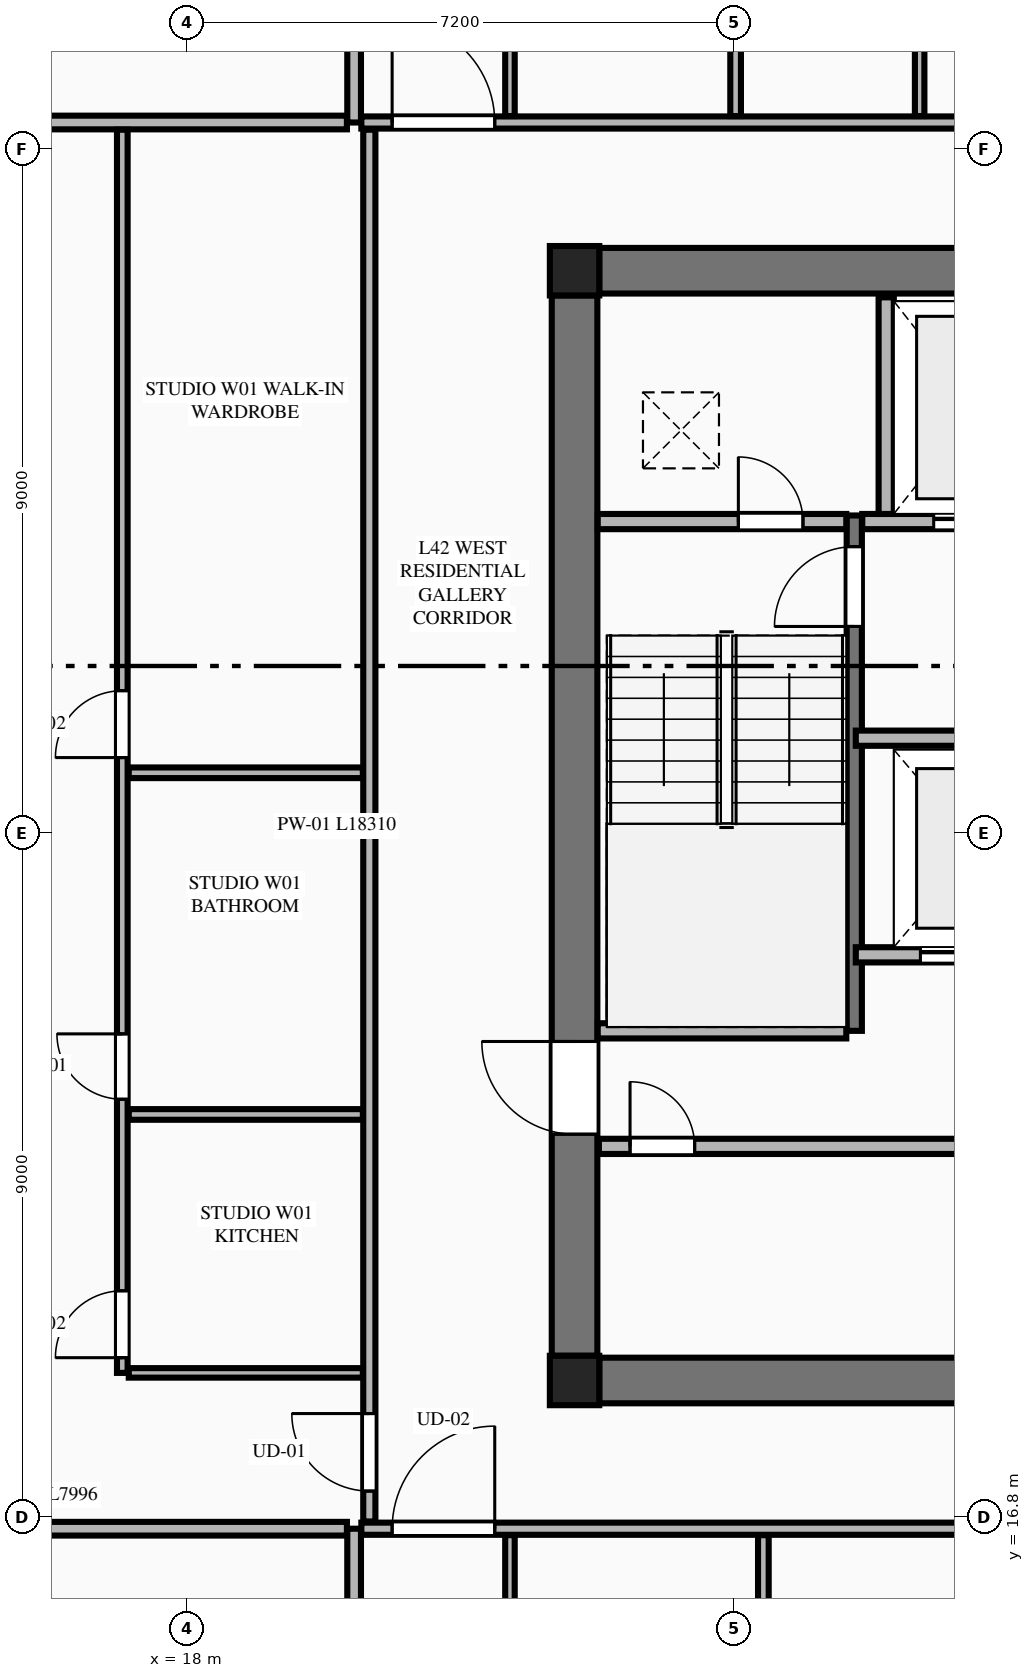
"""IFC4 building model, lengths in metres.
Left out: names, types, materials, properties, quantities, classifications, styles, units other than length and angle.
Written with IfcOpenShell. Run it as: python <this file> out.ifc"""

import sys

from ifc_helpers import new_model, si_unit, direction, frame, frame_2d, origin, origin_2d, place, context, subcontext, project, spatial, rectangle, extrude, element, fill, save


model = new_model("IFC4")
c1 = context("Model", 3, precision=1e-05, world=origin(), true_north=direction((0.0, 1.0)))
c2 = subcontext(c1, "Body", "Model", "MODEL_VIEW")
j1 = project(units=[si_unit("LENGTHUNIT", "METRE"), si_unit("PLANEANGLEUNIT", "RADIAN")], contexts=[c1])
p1 = place(None, origin())
s1 = spatial("IfcSite", under=j1, at=p1, CompositionType="ELEMENT")
p2 = place(p1, origin())
s2 = spatial("IfcBuilding", under=s1, at=p2, CompositionType="ELEMENT")
p3 = place(p2, frame((0.0, 0.0, 160.6)))
s3 = spatial("IfcBuildingStorey", under=s2, at=p3, CompositionType="ELEMENT", Elevation=160.6)
for number, where, z_axis, x_axis in (
    (1, (23.1, 18.6, 0.0), (0.0, 0.0, 1.0), (1.0, 0.0, 0.0)),
    (2, (23.1, 33.2, 0.0), (0.0, 0.0, 1.0), (1.0, 0.0, 0.0)),
):
    element("IfcColumn", number, at=place(p3, frame(where, z_axis=z_axis, x_axis=x_axis)), inside=s3, PredefinedType="COLUMN", context=c2, shape_type="SweptSolid", body=[
        extrude(rectangle(XDim=0.65, YDim=0.65, at=origin_2d()), origin(), (0.0, 0.0, 1.0), 3.55),
    ])
for number, where, z_axis, x_axis in (
    (3, (23.425, 18.6, 0.0), (0.0, 0.0, 1.0), (1.0, 0.0, 0.0)),
    (4, (23.425, 33.2, 0.0), (0.0, 0.0, 1.0), (1.0, 0.0, 0.0)),
):
    element("IfcWall", number, at=place(p3, frame(where, z_axis=z_axis, x_axis=x_axis)), inside=s3, PredefinedType="SHEAR", context=c2, shape_type="SweptSolid", body=[
        extrude(rectangle(XDim=17.95, YDim=0.6, at=frame_2d((8.975, 0.0))), origin(), (0.0, 0.0, 1.0), 3.34),
    ])
p4 = place(p3, frame((23.1, 18.925, 0.0), z_axis=(0.0, 0.0, 1.0), x_axis=(0.0, 1.0, 0.0)))
e5 = element("IfcWall", 5, at=p4, inside=s3, PredefinedType="SHEAR", context=c2, shape_type="SweptSolid", body=[
    extrude(rectangle(XDim=13.95, YDim=0.6, at=frame_2d((6.975, 0.0))), origin(), (0.0, 0.0, 1.0), 3.34),
])
p5 = place(p4, frame((2.915, 0.0, 0.0)))
e6 = element("IfcOpeningElement", 6, at=p5, cuts=e5, PredefinedType="OPENING", context=c2, shape_type="SweptSolid", body=[
    extrude(rectangle(XDim=1.22, YDim=2.25, at=frame_2d((0.61, 1.125))), frame((0.0, 0.31, 0.0), z_axis=(0.0, -1.0, 0.0), x_axis=(1.0, 0.0, 0.0)), (0.0, 0.0, 1.0), 0.62),
])
p6 = place(p3, frame((26.78, 23.2, 0.0), z_axis=(0.0, 0.0, 1.0), x_axis=(0.0, 1.0, 0.0)))
e7 = element("IfcWall", 7, at=p6, inside=s3, PredefinedType="SHEAR", context=c2, shape_type="SweptSolid", body=[
    extrude(rectangle(XDim=6.78, YDim=0.2, at=frame_2d((3.39, 0.0))), origin(), (0.0, 0.0, 1.0), 3.55),
])
p7 = place(p6, frame((5.32, 0.0, 0.0)))
e8 = element("IfcOpeningElement", 8, at=p7, cuts=e7, PredefinedType="OPENING", context=c2, shape_type="SweptSolid", body=[
    extrude(rectangle(XDim=1.05, YDim=2.15, at=frame_2d((0.525, 1.075))), frame((0.0, 0.11, 0.0), z_axis=(0.0, -1.0, 0.0), x_axis=(1.0, 0.0, 0.0)), (0.0, 0.0, 1.0), 0.22),
])
p8 = place(p3, frame((23.405, 23.2, 0.0), z_axis=(0.0, 0.0, 1.0), x_axis=(1.0, 0.0, 0.0)))
e9 = element("IfcWall", 9, at=p8, inside=s3, PredefinedType="PLUMBINGWALL", context=c2, shape_type="SweptSolid", body=[
    extrude(rectangle(XDim=3.27, YDim=0.2, at=frame_2d((1.635, 0.0))), origin(), (0.0, 0.0, 1.0), 3.34),
])
p9 = place(p3, frame((23.405, 29.9, 0.0), z_axis=(0.0, 0.0, 1.0), x_axis=(1.0, 0.0, 0.0)))
e10 = element("IfcWall", 10, at=p9, inside=s3, PredefinedType="PLUMBINGWALL", context=c2, shape_type="SweptSolid", body=[
    extrude(rectangle(XDim=3.27, YDim=0.2, at=frame_2d((1.635, 0.0))), origin(), (0.0, 0.0, 1.0), 3.34),
])
p10 = place(p9, frame((1.85, 0.0, 0.0)))
e11 = element("IfcOpeningElement", 11, at=p10, cuts=e10, PredefinedType="OPENING", context=c2, shape_type="SweptSolid", body=[
    extrude(rectangle(XDim=0.85, YDim=2.05, at=frame_2d((0.425, 1.025))), frame((0.0, 0.11, 0.0), z_axis=(0.0, -1.0, 0.0), x_axis=(1.0, 0.0, 0.0)), (0.0, 0.0, 1.0), 0.22),
])
p11 = place(p3, frame((26.885, 29.9, 0.0), z_axis=(0.0, 0.0, 1.0), x_axis=(1.0, 0.0, 0.0)))
e12 = element("IfcWall", 12, at=p11, inside=s3, PredefinedType="PLUMBINGWALL", context=c2, shape_type="SweptSolid", body=[
    extrude(rectangle(XDim=3.015, YDim=0.2, at=frame_2d((1.507, 0.0))), origin(), (0.0, 0.0, 1.0), 3.34),
])
p12 = place(p11, frame((0.94, 0.0, 0.0)))
e13 = element("IfcOpeningElement", 13, at=p12, cuts=e12, PredefinedType="OPENING", context=c2, shape_type="SweptSolid", body=[
    extrude(rectangle(XDim=1.15, YDim=2.2, at=frame_2d((0.575, 1.1))), frame((0.0, 0.11, 0.0), z_axis=(0.0, -1.0, 0.0), x_axis=(1.0, 0.0, 0.0)), (0.0, 0.0, 1.0), 0.22),
])
p13 = place(p3, frame((27.2, 30.0, 0.0), z_axis=(0.0, 0.0, 1.0), x_axis=(0.0, 1.0, 0.0)))
e14 = element("IfcWall", 14, at=p13, inside=s3, PredefinedType="PLUMBINGWALL", context=c2, shape_type="SweptSolid", body=[
    extrude(rectangle(XDim=2.85, YDim=0.2, at=frame_2d((1.425, 0.0))), origin(), (0.0, 0.0, 1.0), 3.34),
])
p14 = place(p3, frame((26.8, 27.05, 0.0), z_axis=(0.0, 0.0, 1.0), x_axis=(1.0, 0.0, 0.0)))
e15 = element("IfcWall", 15, at=p14, inside=s3, PredefinedType="PLUMBINGWALL", context=c2, shape_type="SweptSolid", body=[
    extrude(rectangle(XDim=3.2, YDim=0.2, at=frame_2d((1.6, 0.0))), origin(), (0.0, 0.0, 1.0), 3.34),
])
p15 = place(p3, frame((26.8, 24.2, 0.0), z_axis=(0.0, 0.0, 1.0), x_axis=(1.0, 0.0, 0.0)))
e16 = element("IfcWall", 16, at=p15, inside=s3, PredefinedType="PLUMBINGWALL", context=c2, shape_type="SweptSolid", body=[
    extrude(rectangle(XDim=3.2, YDim=0.2, at=frame_2d((1.6, 0.0))), origin(), (0.0, 0.0, 1.0), 3.34),
])
p16 = place(p15, frame((0.85, 0.0, 0.0)))
e17 = element("IfcOpeningElement", 17, at=p16, cuts=e16, PredefinedType="OPENING", context=c2, shape_type="SweptSolid", body=[
    extrude(rectangle(XDim=1.1, YDim=2.2, at=frame_2d((0.55, 1.1))), frame((0.0, 0.11, 0.0), z_axis=(0.0, -1.0, 0.0), x_axis=(1.0, 0.0, 0.0)), (0.0, 0.0, 1.0), 0.22),
])
p17 = place(p3, frame((23.42, 21.68, 0.0), z_axis=(0.0, 0.0, 1.0), x_axis=(1.0, 0.0, 0.0)))
e18 = element("IfcWall", 18, at=p17, inside=s3, PredefinedType="PLUMBINGWALL", context=c2, shape_type="SweptSolid", body=[
    extrude(rectangle(XDim=17.96, YDim=0.2, at=frame_2d((8.98, 0.0))), origin(), (0.0, 0.0, 1.0), 3.34),
])
p18 = place(p17, frame((11.6, 0.0, 0.0)))
e19 = element("IfcOpeningElement", 19, at=p18, cuts=e18, PredefinedType="OPENING", context=c2, shape_type="SweptSolid", body=[
    extrude(rectangle(XDim=1.1, YDim=2.2, at=frame_2d((0.55, 1.1))), frame((0.0, 0.11, 0.0), z_axis=(0.0, -1.0, 0.0), x_axis=(1.0, 0.0, 0.0)), (0.0, 0.0, 1.0), 0.22),
])
p19 = place(p17, frame((0.41, 0.0, 0.0)))
e20 = element("IfcOpeningElement", 20, at=p19, cuts=e18, PredefinedType="OPENING", context=c2, shape_type="SweptSolid", body=[
    extrude(rectangle(XDim=0.85, YDim=2.05, at=frame_2d((0.425, 1.025))), frame((0.0, 0.11, 0.0), z_axis=(0.0, -1.0, 0.0), x_axis=(1.0, 0.0, 0.0)), (0.0, 0.0, 1.0), 0.22),
])
p20 = place(p17, frame((6.03, 0.0, 0.0)))
e21 = element("IfcOpeningElement", 21, at=p20, cuts=e18, PredefinedType="OPENING", context=c2, shape_type="SweptSolid", body=[
    extrude(rectangle(XDim=0.85, YDim=2.05, at=frame_2d((0.425, 1.025))), frame((0.0, 0.11, 0.0), z_axis=(0.0, -1.0, 0.0), x_axis=(1.0, 0.0, 0.0)), (0.0, 0.0, 1.0), 0.22),
])
p21 = place(p17, frame((13.78, 0.0, 0.0)))
e22 = element("IfcOpeningElement", 22, at=p21, cuts=e18, PredefinedType="OPENING", context=c2, shape_type="SweptSolid", body=[
    extrude(rectangle(XDim=0.85, YDim=2.05, at=frame_2d((0.425, 1.025))), frame((0.0, 0.11, 0.0), z_axis=(0.0, -1.0, 0.0), x_axis=(1.0, 0.0, 0.0)), (0.0, 0.0, 1.0), 0.22),
])
p22 = place(p3, frame((20.2, 4.105, 0.0), z_axis=(0.0, 0.0, 1.0), x_axis=(0.0, 1.0, 0.0)))
e23 = element("IfcWall", 23, at=p22, inside=s3, PredefinedType="PARTITIONING", context=c2, shape_type="SweptSolid", body=[
    extrude(rectangle(XDim=12.545, YDim=0.18, at=frame_2d((6.272, 0.0))), origin(), (0.0, 0.0, 1.0), 3.34),
])
p23 = place(p3, frame((20.295, 16.65, 0.0), z_axis=(0.0, 0.0, 1.0), x_axis=(1.0, 0.0, 0.0)))
e24 = element("IfcWall", 24, at=p23, inside=s3, PredefinedType="PARTITIONING", context=c2, shape_type="SweptSolid", body=[
    extrude(rectangle(XDim=24.21, YDim=0.16, at=frame_2d((12.105, 0.0))), origin(), (0.0, 0.0, 1.0), 3.34),
])
p24 = place(p23, frame((0.405, 0.0, 0.0)))
e25 = element("IfcOpeningElement", 25, at=p24, cuts=e24, PredefinedType="OPENING", context=c2, shape_type="SweptSolid", body=[
    extrude(rectangle(XDim=1.35, YDim=2.35, at=frame_2d((0.675, 1.175))), frame((0.0, 0.09, 0.0), z_axis=(0.0, -1.0, 0.0), x_axis=(1.0, 0.0, 0.0)), (0.0, 0.0, 1.0), 0.18),
])
p25 = place(p3, frame((22.25, 11.612, 0.0), z_axis=(0.0, 0.0, 1.0), x_axis=(0.0, 1.0, 0.0)))
e26 = element("IfcWall", 26, at=p25, inside=s3, PredefinedType="PARTITIONING", context=c2, shape_type="SweptSolid", body=[
    extrude(rectangle(XDim=4.953, YDim=0.125, at=frame_2d((2.477, 0.0))), origin(), (0.0, 0.0, 1.0), 2.722),
])
p26 = place(p3, frame((25.584, 11.612, 0.0), z_axis=(0.0, 0.0, 1.0), x_axis=(0.0, 1.0, 0.0)))
e27 = element("IfcWall", 27, at=p26, inside=s3, PredefinedType="PLUMBINGWALL", context=c2, shape_type="SweptSolid", body=[
    extrude(rectangle(XDim=4.953, YDim=0.14, at=frame_2d((2.477, 0.0))), origin(), (0.0, 0.0, 1.0), 3.34),
])
p27 = place(p3, frame((20.2, 35.15, 0.0), z_axis=(0.0, 0.0, 1.0), x_axis=(0.0, 1.0, 0.0)))
e28 = element("IfcWall", 28, at=p27, inside=s3, PredefinedType="PARTITIONING", context=c2, shape_type="SweptSolid", body=[
    extrude(rectangle(XDim=12.345, YDim=0.18, at=frame_2d((6.173, 0.0))), origin(), (0.0, 0.0, 1.0), 3.34),
])
p28 = place(p3, frame((20.295, 35.15, 0.0), z_axis=(0.0, 0.0, 1.0), x_axis=(1.0, 0.0, 0.0)))
e29 = element("IfcWall", 29, at=p28, inside=s3, PredefinedType="PARTITIONING", context=c2, shape_type="SweptSolid", body=[
    extrude(rectangle(XDim=24.21, YDim=0.16, at=frame_2d((12.105, 0.0))), origin(), (0.0, 0.0, 1.0), 3.34),
])
p29 = place(p28, frame((0.405, 0.0, 0.0)))
e30 = element("IfcOpeningElement", 30, at=p29, cuts=e29, PredefinedType="OPENING", context=c2, shape_type="SweptSolid", body=[
    extrude(rectangle(XDim=1.35, YDim=2.35, at=frame_2d((0.675, 1.175))), frame((0.0, 0.09, 0.0), z_axis=(0.0, -1.0, 0.0), x_axis=(1.0, 0.0, 0.0)), (0.0, 0.0, 1.0), 0.18),
])
p30 = place(p3, frame((22.25, 35.235, 0.0), z_axis=(0.0, 0.0, 1.0), x_axis=(0.0, 1.0, 0.0)))
e31 = element("IfcWall", 31, at=p30, inside=s3, PredefinedType="PARTITIONING", context=c2, shape_type="SweptSolid", body=[
    extrude(rectangle(XDim=5.242, YDim=0.125, at=frame_2d((2.621, 0.0))), origin(), (0.0, 0.0, 1.0), 2.722),
])
p31 = place(p3, frame((25.219, 35.235, 0.0), z_axis=(0.0, 0.0, 1.0), x_axis=(0.0, 1.0, 0.0)))
e32 = element("IfcWall", 32, at=p31, inside=s3, PredefinedType="PLUMBINGWALL", context=c2, shape_type="SweptSolid", body=[
    extrude(rectangle(XDim=5.242, YDim=0.14, at=frame_2d((2.621, 0.0))), origin(), (0.0, 0.0, 1.0), 3.34),
])
p32 = place(p3, frame((27.64, 35.235, 0.0), z_axis=(0.0, 0.0, 1.0), x_axis=(0.0, 1.0, 0.0)))
e33 = element("IfcWall", 33, at=p32, inside=s3, PredefinedType="PARTITIONING", context=c2, shape_type="SweptSolid", body=[
    extrude(rectangle(XDim=5.242, YDim=0.125, at=frame_2d((2.621, 0.0))), origin(), (0.0, 0.0, 1.0), 3.34),
])
p33 = place(p3, frame((12.109, 16.65, 0.0), z_axis=(0.0, 0.0, 1.0), x_axis=(1.0, 0.0, 0.0)))
e34 = element("IfcWall", 34, at=p33, inside=s3, PredefinedType="PARTITIONING", context=c2, shape_type="SweptSolid", body=[
    extrude(rectangle(XDim=7.996, YDim=0.18, at=frame_2d((3.998, 0.0))), origin(), (0.0, 0.0, 1.0), 3.34),
])
p34 = place(p3, frame((12.21, 35.15, 0.0), z_axis=(0.0, 0.0, 1.0), x_axis=(1.0, 0.0, 0.0)))
e35 = element("IfcWall", 35, at=p34, inside=s3, PredefinedType="PARTITIONING", context=c2, shape_type="SweptSolid", body=[
    extrude(rectangle(XDim=7.895, YDim=0.18, at=frame_2d((3.948, 0.0))), origin(), (0.0, 0.0, 1.0), 3.34),
])
p35 = place(p3, frame((20.4, 16.745, 0.0), z_axis=(0.0, 0.0, 1.0), x_axis=(0.0, 1.0, 0.0)))
e36 = element("IfcWall", 36, at=p35, inside=s3, PredefinedType="PARTITIONING", context=c2, shape_type="SweptSolid", body=[
    extrude(rectangle(XDim=18.31, YDim=0.16, at=frame_2d((9.155, 0.0))), origin(), (0.0, 0.0, 1.0), 3.34),
])
p36 = place(p35, frame((0.4, 0.0, 0.0)))
e37 = element("IfcOpeningElement", 37, at=p36, cuts=e36, PredefinedType="OPENING", context=c2, shape_type="SweptSolid", body=[
    extrude(rectangle(XDim=1.02, YDim=2.25, at=frame_2d((0.51, 1.125))), frame((0.0, 0.09, 0.0), z_axis=(0.0, -1.0, 0.0), x_axis=(1.0, 0.0, 0.0)), (0.0, 0.0, 1.0), 0.18),
])
p37 = place(p3, frame((17.235, 18.7, 0.0), z_axis=(0.0, 0.0, 1.0), x_axis=(1.0, 0.0, 0.0)))
e38 = element("IfcWall", 38, at=p37, inside=s3, PredefinedType="PARTITIONING", context=c2, shape_type="SweptSolid", body=[
    extrude(rectangle(XDim=3.08, YDim=0.125, at=frame_2d((1.54, 0.0))), origin(), (0.0, 0.0, 1.0), 2.722),
])
p38 = place(p3, frame((17.15, 18.7, 0.0), z_axis=(0.0, 0.0, 1.0), x_axis=(0.0, 1.0, 0.0)))
e39 = element("IfcWall", 39, at=p38, inside=s3, PredefinedType="PLUMBINGWALL", context=c2, shape_type="SweptSolid", body=[
    extrude(rectangle(XDim=16.355, YDim=0.14, at=frame_2d((8.177, 0.0))), origin(), (0.0, 0.0, 1.0), 3.34),
])
p39 = place(p38, frame((3.6, 0.0, 0.0)))
e40 = element("IfcOpeningElement", 40, at=p39, cuts=e39, PredefinedType="OPENING", context=c2, shape_type="SweptSolid", body=[
    extrude(rectangle(XDim=0.86, YDim=2.1, at=frame_2d((0.43, 1.05))), frame((0.0, 0.08, 0.0), z_axis=(0.0, -1.0, 0.0), x_axis=(1.0, 0.0, 0.0)), (0.0, 0.0, 1.0), 0.16),
])
p40 = place(p38, frame((8.095, 0.0, 0.0)))
e41 = element("IfcOpeningElement", 41, at=p40, cuts=e39, PredefinedType="OPENING", context=c2, shape_type="SweptSolid", body=[
    extrude(rectangle(XDim=0.88, YDim=2.15, at=frame_2d((0.44, 1.075))), frame((0.0, 0.08, 0.0), z_axis=(0.0, -1.0, 0.0), x_axis=(1.0, 0.0, 0.0)), (0.0, 0.0, 1.0), 0.16),
])
p41 = place(p38, frame((0.2, 0.0, 0.0)))
e42 = element("IfcOpeningElement", 42, at=p41, cuts=e39, PredefinedType="OPENING", context=c2, shape_type="SweptSolid", body=[
    extrude(rectangle(XDim=0.88, YDim=2.15, at=frame_2d((0.44, 1.075))), frame((0.0, 0.08, 0.0), z_axis=(0.0, -1.0, 0.0), x_axis=(1.0, 0.0, 0.0)), (0.0, 0.0, 1.0), 0.16),
])
for number, where, z_axis, x_axis in (
    (43, (17.235, 22.1, 0.0), (0.0, 0.0, 1.0), (1.0, 0.0, 0.0)),
    (44, (17.235, 26.595, 0.0), (0.0, 0.0, 1.0), (1.0, 0.0, 0.0)),
):
    element("IfcWall", number, at=place(p3, frame(where, z_axis=z_axis, x_axis=x_axis)), inside=s3, PredefinedType="PLUMBINGWALL", context=c2, shape_type="SweptSolid", body=[
        extrude(rectangle(XDim=3.08, YDim=0.14, at=frame_2d((1.54, 0.0))), origin(), (0.0, 0.0, 1.0), 3.34),
    ])
p42 = place(p5, origin())
e45 = element("IfcDoor", 45, at=p42, inside=s3, OperationType="SINGLE_SWING_RIGHT", PredefinedType="DOOR", context=c2, shape_type="SweptSolid", body=[
    extrude(rectangle(XDim=1.22, YDim=2.25, at=frame_2d((0.61, 1.125))), frame((0.0, 0.025, 0.0), z_axis=(0.0, -1.0, 0.0), x_axis=(1.0, 0.0, 0.0)), (0.0, 0.0, 1.0), 0.05),
])
fill(e6, e45)
p43 = place(p7, origin())
e46 = element("IfcDoor", 46, at=p43, inside=s3, OperationType="SINGLE_SWING_LEFT", PredefinedType="DOOR", context=c2, shape_type="SweptSolid", body=[
    extrude(rectangle(XDim=1.05, YDim=2.15, at=frame_2d((0.525, 1.075))), frame((0.0, 0.025, 0.0), z_axis=(0.0, -1.0, 0.0), x_axis=(1.0, 0.0, 0.0)), (0.0, 0.0, 1.0), 0.05),
])
fill(e8, e46)
p44 = place(p10, origin())
e47 = element("IfcDoor", 47, at=p44, inside=s3, OperationType="SINGLE_SWING_LEFT", PredefinedType="DOOR", context=c2, shape_type="SweptSolid", body=[
    extrude(rectangle(XDim=0.85, YDim=2.05, at=frame_2d((0.425, 1.025))), frame((0.0, 0.025, 0.0), z_axis=(0.0, -1.0, 0.0), x_axis=(1.0, 0.0, 0.0)), (0.0, 0.0, 1.0), 0.05),
])
fill(e11, e47)
p45 = place(p12, origin())
e48 = element("IfcDoor", 48, at=p45, inside=s3, OperationType="DOUBLE_DOOR_SLIDING", PredefinedType="DOOR", context=c2, shape_type="SweptSolid", body=[
    extrude(rectangle(XDim=1.15, YDim=2.2, at=frame_2d((0.575, 1.1))), frame((0.0, 0.025, 0.0), z_axis=(0.0, -1.0, 0.0), x_axis=(1.0, 0.0, 0.0)), (0.0, 0.0, 1.0), 0.05),
])
fill(e13, e48)
p46 = place(p16, origin())
e49 = element("IfcDoor", 49, at=p46, inside=s3, OperationType="DOUBLE_DOOR_SLIDING", PredefinedType="DOOR", context=c2, shape_type="SweptSolid", body=[
    extrude(rectangle(XDim=1.1, YDim=2.2, at=frame_2d((0.55, 1.1))), frame((0.0, 0.025, 0.0), z_axis=(0.0, -1.0, 0.0), x_axis=(1.0, 0.0, 0.0)), (0.0, 0.0, 1.0), 0.05),
])
fill(e17, e49)
p47 = place(p19, origin())
e50 = element("IfcDoor", 50, at=p47, inside=s3, OperationType="SINGLE_SWING_LEFT", PredefinedType="DOOR", context=c2, shape_type="SweptSolid", body=[
    extrude(rectangle(XDim=0.85, YDim=2.05, at=frame_2d((0.425, 1.025))), frame((0.0, 0.025, 0.0), z_axis=(0.0, -1.0, 0.0), x_axis=(1.0, 0.0, 0.0)), (0.0, 0.0, 1.0), 0.05),
])
fill(e20, e50)
p48 = place(p24, origin())
e51 = element("IfcDoor", 51, at=p48, inside=s3, OperationType="SINGLE_SWING_RIGHT", PredefinedType="DOOR", context=c2, shape_type="SweptSolid", body=[
    extrude(rectangle(XDim=1.35, YDim=2.35, at=frame_2d((0.675, 1.175))), frame((0.0, 0.025, 0.0), z_axis=(0.0, -1.0, 0.0), x_axis=(1.0, 0.0, 0.0)), (0.0, 0.0, 1.0), 0.05),
])
fill(e25, e51)
p49 = place(p29, origin())
e52 = element("IfcDoor", 52, at=p49, inside=s3, OperationType="SINGLE_SWING_LEFT", PredefinedType="DOOR", context=c2, shape_type="SweptSolid", body=[
    extrude(rectangle(XDim=1.35, YDim=2.35, at=frame_2d((0.675, 1.175))), frame((0.0, 0.025, 0.0), z_axis=(0.0, -1.0, 0.0), x_axis=(1.0, 0.0, 0.0)), (0.0, 0.0, 1.0), 0.05),
])
fill(e30, e52)
p50 = place(p39, origin())
e53 = element("IfcDoor", 53, at=p50, inside=s3, OperationType="SINGLE_SWING_RIGHT", PredefinedType="DOOR", context=c2, shape_type="SweptSolid", body=[
    extrude(rectangle(XDim=0.86, YDim=2.1, at=frame_2d((0.43, 1.05))), frame((0.0, 0.025, 0.0), z_axis=(0.0, -1.0, 0.0), x_axis=(1.0, 0.0, 0.0)), (0.0, 0.0, 1.0), 0.05),
])
fill(e40, e53)
p51 = place(p40, origin())
e54 = element("IfcDoor", 54, at=p51, inside=s3, OperationType="SINGLE_SWING_LEFT", PredefinedType="DOOR", context=c2, shape_type="SweptSolid", body=[
    extrude(rectangle(XDim=0.88, YDim=2.15, at=frame_2d((0.44, 1.075))), frame((0.0, 0.025, 0.0), z_axis=(0.0, -1.0, 0.0), x_axis=(1.0, 0.0, 0.0)), (0.0, 0.0, 1.0), 0.05),
])
fill(e41, e54)
p52 = place(p36, origin())
e55 = element("IfcDoor", 55, at=p52, inside=s3, OperationType="SINGLE_SWING_RIGHT", PredefinedType="DOOR", context=c2, shape_type="SweptSolid", body=[
    extrude(rectangle(XDim=1.02, YDim=2.25, at=frame_2d((0.51, 1.125))), frame((0.0, 0.025, 0.0), z_axis=(0.0, -1.0, 0.0), x_axis=(1.0, 0.0, 0.0)), (0.0, 0.0, 1.0), 0.05),
])
fill(e37, e55)
p53 = place(p41, origin())
e56 = element("IfcDoor", 56, at=p53, inside=s3, OperationType="SINGLE_SWING_LEFT", PredefinedType="DOOR", context=c2, shape_type="SweptSolid", body=[
    extrude(rectangle(XDim=0.88, YDim=2.15, at=frame_2d((0.44, 1.075))), frame((0.0, 0.025, 0.0), z_axis=(0.0, -1.0, 0.0), x_axis=(1.0, 0.0, 0.0)), (0.0, 0.0, 1.0), 0.05),
])
fill(e42, e56)
save(model, sys.argv[1])
